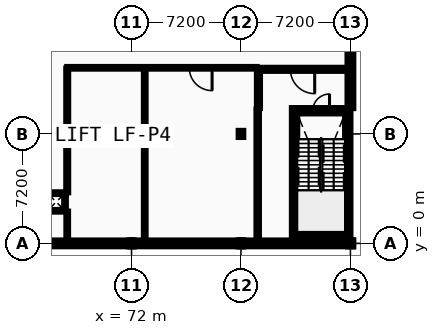
"""IFC4 building model, lengths in metres.
Left out: names, types, materials, properties, quantities, classifications, styles, units other than length and angle.
Written with IfcOpenShell. Run it as: python <this file> out.ifc"""

import sys

from ifc_helpers import new_model, si_unit, direction, frame, frame_2d, origin, origin_2d, place, context, subcontext, project, spatial, rectangle, i_section, extrude, element, fill, save


model = new_model("IFC4")
c1 = context("Model", 3, precision=1e-05, world=origin(), true_north=direction((0.0, 1.0)))
c2 = subcontext(c1, "Body", "Model", "MODEL_VIEW")
j1 = project(units=[si_unit("LENGTHUNIT", "METRE"), si_unit("PLANEANGLEUNIT", "RADIAN")], contexts=[c1])
p1 = place(None, origin())
s1 = spatial("IfcSite", under=j1, at=p1, CompositionType="ELEMENT")
p2 = place(p1, origin())
s2 = spatial("IfcBuilding", under=s1, at=p2, CompositionType="ELEMENT")
p3 = place(p2, frame((0.0, 0.0, 5.2)))
s3 = spatial("IfcBuildingStorey", under=s2, at=p3, CompositionType="ELEMENT", Elevation=5.2)
for number, where, z_axis, x_axis in (
    (1, (72.0, 0.0, 0.0), (0.0, 0.0, 1.0), (1.0, 0.0, 0.0)),
    (2, (72.0, 7.2, 0.0), (0.0, 0.0, 1.0), (1.0, 0.0, 0.0)),
    (3, (79.2, 0.0, 0.0), (0.0, 0.0, 1.0), (1.0, 0.0, 0.0)),
    (4, (79.2, 7.2, 0.0), (0.0, 0.0, 1.0), (1.0, 0.0, 0.0)),
    (5, (86.4, 0.0, 0.0), (0.0, 0.0, 1.0), (1.0, 0.0, 0.0)),
):
    element("IfcColumn", number, at=place(p3, frame(where, z_axis=z_axis, x_axis=x_axis)), inside=s3, PredefinedType="COLUMN", context=c2, shape_type="SweptSolid", body=[
        extrude(i_section(OverallWidth=0.3, OverallDepth=0.4, WebThickness=0.013, FlangeThickness=0.024, FilletRadius=0.027, at=origin_2d()), origin(), (0.0, 0.0, 1.0), 4.4),
    ])
p4 = place(p3, frame((64.8, 0.0, 0.0), z_axis=(0.0, 0.0, 1.0), x_axis=(1.0, 0.0, 0.0)))
e6 = element("IfcWall", 6, at=p4, inside=s3, PredefinedType="STANDARD", context=c2, shape_type="SweptSolid", body=[
    extrude(rectangle(XDim=7.2, YDim=0.38, at=frame_2d((3.6, 0.0))), origin(), (0.0, 0.0, 1.0), 3.88),
])
p5 = place(p4, frame((1.611, 0.0, 0.95)))
e7 = element("IfcOpeningElement", 7, at=p5, cuts=e6, PredefinedType="OPENING", context=c2, shape_type="SweptSolid", body=[
    extrude(rectangle(XDim=1.098, YDim=1.26, at=frame_2d((0.549, 0.63))), frame((0.0, 0.2, 0.0), z_axis=(0.0, -1.0, 0.0), x_axis=(1.0, 0.0, 0.0)), (0.0, 0.0, 1.0), 0.4),
])
p6 = place(p4, frame((4.491, 0.0, 0.95)))
e8 = element("IfcOpeningElement", 8, at=p6, cuts=e6, PredefinedType="OPENING", context=c2, shape_type="SweptSolid", body=[
    extrude(rectangle(XDim=1.098, YDim=1.26, at=frame_2d((0.549, 0.63))), frame((0.0, 0.2, 0.0), z_axis=(0.0, -1.0, 0.0), x_axis=(1.0, 0.0, 0.0)), (0.0, 0.0, 1.0), 0.4),
])
p7 = place(p3, frame((72.0, 0.0, 0.0), z_axis=(0.0, 0.0, 1.0), x_axis=(1.0, 0.0, 0.0)))
e9 = element("IfcWall", 9, at=p7, inside=s3, PredefinedType="STANDARD", context=c2, shape_type="SweptSolid", body=[
    extrude(rectangle(XDim=7.2, YDim=0.38, at=frame_2d((3.6, 0.0))), origin(), (0.0, 0.0, 1.0), 3.88),
])
p8 = place(p7, frame((1.594, 0.0, 0.95)))
e10 = element("IfcOpeningElement", 10, at=p8, cuts=e9, PredefinedType="OPENING", context=c2, shape_type="SweptSolid", body=[
    extrude(rectangle(XDim=1.132, YDim=1.26, at=frame_2d((0.566, 0.63))), frame((0.0, 0.2, 0.0), z_axis=(0.0, -1.0, 0.0), x_axis=(1.0, 0.0, 0.0)), (0.0, 0.0, 1.0), 0.4),
])
p9 = place(p7, frame((4.474, 0.0, 0.95)))
e11 = element("IfcOpeningElement", 11, at=p9, cuts=e9, PredefinedType="OPENING", context=c2, shape_type="SweptSolid", body=[
    extrude(rectangle(XDim=1.132, YDim=1.26, at=frame_2d((0.566, 0.63))), frame((0.0, 0.2, 0.0), z_axis=(0.0, -1.0, 0.0), x_axis=(1.0, 0.0, 0.0)), (0.0, 0.0, 1.0), 0.4),
])
p10 = place(p3, frame((79.2, 0.0, 0.0), z_axis=(0.0, 0.0, 1.0), x_axis=(1.0, 0.0, 0.0)))
e12 = element("IfcWall", 12, at=p10, inside=s3, PredefinedType="STANDARD", context=c2, shape_type="SweptSolid", body=[
    extrude(rectangle(XDim=7.39, YDim=0.38, at=frame_2d((3.695, 0.0))), origin(), (0.0, 0.0, 1.0), 3.88),
])
p11 = place(p10, frame((1.634, 0.0, 0.95)))
e13 = element("IfcOpeningElement", 13, at=p11, cuts=e12, PredefinedType="OPENING", context=c2, shape_type="SweptSolid", body=[
    extrude(rectangle(XDim=1.166, YDim=1.26, at=frame_2d((0.583, 0.63))), frame((0.0, 0.2, 0.0), z_axis=(0.0, -1.0, 0.0), x_axis=(1.0, 0.0, 0.0)), (0.0, 0.0, 1.0), 0.4),
])
p12 = place(p10, frame((4.59, 0.0, 0.95)))
e14 = element("IfcOpeningElement", 14, at=p12, cuts=e12, PredefinedType="OPENING", context=c2, shape_type="SweptSolid", body=[
    extrude(rectangle(XDim=1.166, YDim=1.26, at=frame_2d((0.583, 0.63))), frame((0.0, 0.2, 0.0), z_axis=(0.0, -1.0, 0.0), x_axis=(1.0, 0.0, 0.0)), (0.0, 0.0, 1.0), 0.4),
])
p13 = place(p3, frame((86.4, 8.9, 0.0), z_axis=(0.0, 0.0, 1.0), x_axis=(0.0, 1.0, 0.0)))
e15 = element("IfcWall", 15, at=p13, inside=s3, PredefinedType="STANDARD", context=c2, shape_type="SweptSolid", body=[
    extrude(rectangle(XDim=5.5, YDim=0.38, at=frame_2d((2.75, 0.0))), origin(), (0.0, 0.0, 1.0), 4.185),
])
p14 = place(p3, frame((82.9, 0.575, 0.0), z_axis=(0.0, 0.0, 1.0), x_axis=(1.0, 0.0, 0.0)))
e16 = element("IfcWall", 16, at=p14, inside=s3, PredefinedType="SHEAR", context=c2, shape_type="SweptSolid", body=[
    extrude(rectangle(XDim=3.15, YDim=0.35, at=frame_2d((1.575, 0.0))), origin(), (0.0, 0.0, 1.0), 4.185),
])
p15 = place(p3, frame((82.9, 8.725, 0.0), z_axis=(0.0, 0.0, 1.0), x_axis=(1.0, 0.0, 0.0)))
e17 = element("IfcWall", 17, at=p15, inside=s3, PredefinedType="SHEAR", context=c2, shape_type="SweptSolid", body=[
    extrude(rectangle(XDim=3.15, YDim=0.35, at=frame_2d((1.575, 0.0))), origin(), (0.0, 0.0, 1.0), 4.185),
])
p16 = place(p15, frame((1.025, 0.0, 0.0)))
e18 = element("IfcOpeningElement", 18, at=p16, cuts=e17, PredefinedType="OPENING", context=c2, shape_type="SweptSolid", body=[
    extrude(rectangle(XDim=1.1, YDim=2.15, at=frame_2d((0.55, 1.075))), frame((0.0, 0.185, 0.0), z_axis=(0.0, -1.0, 0.0), x_axis=(1.0, 0.0, 0.0)), (0.0, 0.0, 1.0), 0.37),
])
for number, where, z_axis, x_axis in (
    (19, (82.725, 0.19, 0.0), (0.0, 0.0, 1.0), (0.0, 1.0, 0.0)),
    (20, (86.225, 0.19, 0.0), (0.0, 0.0, 1.0), (0.0, 1.0, 0.0)),
):
    element("IfcWall", number, at=place(p3, frame(where, z_axis=z_axis, x_axis=x_axis)), inside=s3, PredefinedType="SHEAR", context=c2, shape_type="SweptSolid", body=[
        extrude(rectangle(XDim=8.71, YDim=0.35, at=frame_2d((4.355, 0.0))), origin(), (0.0, 0.0, 1.0), 4.185),
    ])
p17 = place(p3, frame((80.45, 11.45, 0.0), z_axis=(0.0, 0.0, 1.0), x_axis=(1.0, 0.0, 0.0)))
e21 = element("IfcWall", 21, at=p17, inside=s3, PredefinedType="PARTITIONING", context=c2, shape_type="SweptSolid", body=[
    extrude(rectangle(XDim=5.6, YDim=0.2, at=frame_2d((2.8, 0.0))), origin(), (0.0, 0.0, 1.0), 4.185),
])
p18 = place(p17, frame((2.0, 0.0, 0.0)))
e22 = element("IfcOpeningElement", 22, at=p18, cuts=e21, PredefinedType="OPENING", context=c2, shape_type="SweptSolid", body=[
    extrude(rectangle(XDim=1.6, YDim=2.2, at=frame_2d((0.8, 1.1))), frame((0.0, 0.11, 0.0), z_axis=(0.0, -1.0, 0.0), x_axis=(1.0, 0.0, 0.0)), (0.0, 0.0, 1.0), 0.22),
])
p19 = place(p3, frame((80.35, 8.9, 0.0), z_axis=(0.0, 0.0, 1.0), x_axis=(0.0, 1.0, 0.0)))
e23 = element("IfcWall", 23, at=p19, inside=s3, PredefinedType="PARTITIONING", context=c2, shape_type="SweptSolid", body=[
    extrude(rectangle(XDim=2.45, YDim=0.2, at=frame_2d((1.225, 0.0))), origin(), (0.0, 0.0, 1.0), 4.185),
])
for number, where, z_axis, x_axis in (
    (24, (66.41, 2.145, 0.0), (0.0, 0.0, 1.0), (1.0, 0.0, 0.0)),
    (25, (66.41, 3.305, 0.0), (0.0, 0.0, 1.0), (1.0, 0.0, 0.0)),
):
    element("IfcWall", number, at=place(p3, frame(where, z_axis=z_axis, x_axis=x_axis)), inside=s3, PredefinedType="PARTITIONING", context=c2, shape_type="SweptSolid", body=[
        extrude(rectangle(XDim=1.27, YDim=0.11, at=frame_2d((0.635, 0.0))), origin(), (0.0, 0.0, 1.0), 4.185),
    ])
p20 = place(p3, frame((67.625, 2.2, 0.0), z_axis=(0.0, 0.0, 1.0), x_axis=(0.0, 1.0, 0.0)))
e26 = element("IfcWall", 26, at=p20, inside=s3, PredefinedType="PARTITIONING", context=c2, shape_type="SweptSolid", body=[
    extrude(rectangle(XDim=1.05, YDim=0.11, at=frame_2d((0.525, 0.0))), origin(), (0.0, 0.0, 1.0), 4.185),
])
p21 = place(p3, frame((67.77, 11.55, 0.0), z_axis=(0.0, 0.0, 1.0), x_axis=(1.0, 0.0, 0.0)))
e27 = element("IfcWall", 27, at=p21, inside=s3, PredefinedType="PARTITIONING", context=c2, shape_type="SweptSolid", body=[
    extrude(rectangle(XDim=12.46, YDim=0.11, at=frame_2d((6.23, 0.0))), origin(), (0.0, 0.0, 1.0), 4.185),
])
p22 = place(p21, frame((0.45, 0.0, 0.0)))
e28 = element("IfcOpeningElement", 28, at=p22, cuts=e27, PredefinedType="OPENING", context=c2, shape_type="SweptSolid", body=[
    extrude(rectangle(XDim=1.0, YDim=2.1, at=frame_2d((0.5, 1.05))), frame((0.0, 0.065, 0.0), z_axis=(0.0, -1.0, 0.0), x_axis=(1.0, 0.0, 0.0)), (0.0, 0.0, 1.0), 0.13),
])
p23 = place(p21, frame((8.03, 0.0, 0.0)))
e29 = element("IfcOpeningElement", 29, at=p23, cuts=e27, PredefinedType="OPENING", context=c2, shape_type="SweptSolid", body=[
    extrude(rectangle(XDim=1.5, YDim=2.2, at=frame_2d((0.75, 1.1))), frame((0.0, 0.065, 0.0), z_axis=(0.0, -1.0, 0.0), x_axis=(1.0, 0.0, 0.0)), (0.0, 0.0, 1.0), 0.13),
])
p24 = place(p3, frame((67.77, 0.2, 0.0), z_axis=(0.0, 0.0, 1.0), x_axis=(0.0, 1.0, 0.0)))
e30 = element("IfcWall", 30, at=p24, inside=s3, PredefinedType="PARTITIONING", context=c2, shape_type="SweptSolid", body=[
    extrude(rectangle(XDim=1.89, YDim=0.11, at=frame_2d((0.945, 0.0))), origin(), (0.0, 0.0, 1.0), 4.185),
])
p25 = place(p3, frame((67.77, 3.36, 0.0), z_axis=(0.0, 0.0, 1.0), x_axis=(0.0, 1.0, 0.0)))
e31 = element("IfcWall", 31, at=p25, inside=s3, PredefinedType="PARTITIONING", context=c2, shape_type="SweptSolid", body=[
    extrude(rectangle(XDim=8.135, YDim=0.125, at=frame_2d((4.067, 0.0))), origin(), (0.0, 0.0, 1.0), 4.185),
])
p26 = place(p3, frame((72.87, 0.2, 0.0), z_axis=(0.0, 0.0, 1.0), x_axis=(0.0, 1.0, 0.0)))
e32 = element("IfcWall", 32, at=p26, inside=s3, PredefinedType="PARTITIONING", context=c2, shape_type="SweptSolid", body=[
    extrude(rectangle(XDim=11.295, YDim=0.11, at=frame_2d((5.647, 0.0))), origin(), (0.0, 0.0, 1.0), 4.185),
])
p27 = place(p3, frame((80.3, 0.2, 0.0), z_axis=(0.0, 0.0, 1.0), x_axis=(0.0, 1.0, 0.0)))
e33 = element("IfcWall", 33, at=p27, inside=s3, PredefinedType="PARTITIONING", context=c2, shape_type="SweptSolid", body=[
    extrude(rectangle(XDim=8.6, YDim=0.16, at=frame_2d((4.3, 0.0))), origin(), (0.0, 0.0, 1.0), 4.185),
])
p28 = place(p5, origin())
e34 = element("IfcWindow", 34, at=p28, inside=s3, PartitioningType="SINGLE_PANEL", PredefinedType="WINDOW", context=c2, shape_type="SweptSolid", body=[
    extrude(rectangle(XDim=1.098, YDim=1.26, at=frame_2d((0.549, 0.63))), frame((0.0, 0.03, 0.0), z_axis=(0.0, -1.0, 0.0), x_axis=(1.0, 0.0, 0.0)), (0.0, 0.0, 1.0), 0.06),
])
fill(e7, e34)
p29 = place(p6, origin())
e35 = element("IfcWindow", 35, at=p29, inside=s3, PartitioningType="SINGLE_PANEL", PredefinedType="WINDOW", context=c2, shape_type="SweptSolid", body=[
    extrude(rectangle(XDim=1.098, YDim=1.26, at=frame_2d((0.549, 0.63))), frame((0.0, 0.03, 0.0), z_axis=(0.0, -1.0, 0.0), x_axis=(1.0, 0.0, 0.0)), (0.0, 0.0, 1.0), 0.06),
])
fill(e8, e35)
p30 = place(p8, origin())
e36 = element("IfcWindow", 36, at=p30, inside=s3, PartitioningType="SINGLE_PANEL", PredefinedType="WINDOW", context=c2, shape_type="SweptSolid", body=[
    extrude(rectangle(XDim=1.132, YDim=1.26, at=frame_2d((0.566, 0.63))), frame((0.0, 0.03, 0.0), z_axis=(0.0, -1.0, 0.0), x_axis=(1.0, 0.0, 0.0)), (0.0, 0.0, 1.0), 0.06),
])
fill(e10, e36)
p31 = place(p9, origin())
e37 = element("IfcWindow", 37, at=p31, inside=s3, PartitioningType="SINGLE_PANEL", PredefinedType="WINDOW", context=c2, shape_type="SweptSolid", body=[
    extrude(rectangle(XDim=1.132, YDim=1.26, at=frame_2d((0.566, 0.63))), frame((0.0, 0.03, 0.0), z_axis=(0.0, -1.0, 0.0), x_axis=(1.0, 0.0, 0.0)), (0.0, 0.0, 1.0), 0.06),
])
fill(e11, e37)
p32 = place(p11, origin())
e38 = element("IfcWindow", 38, at=p32, inside=s3, PartitioningType="SINGLE_PANEL", PredefinedType="WINDOW", context=c2, shape_type="SweptSolid", body=[
    extrude(rectangle(XDim=1.166, YDim=1.26, at=frame_2d((0.583, 0.63))), frame((0.0, 0.03, 0.0), z_axis=(0.0, -1.0, 0.0), x_axis=(1.0, 0.0, 0.0)), (0.0, 0.0, 1.0), 0.06),
])
fill(e13, e38)
p33 = place(p12, origin())
e39 = element("IfcWindow", 39, at=p33, inside=s3, PartitioningType="SINGLE_PANEL", PredefinedType="WINDOW", context=c2, shape_type="SweptSolid", body=[
    extrude(rectangle(XDim=1.166, YDim=1.26, at=frame_2d((0.583, 0.63))), frame((0.0, 0.03, 0.0), z_axis=(0.0, -1.0, 0.0), x_axis=(1.0, 0.0, 0.0)), (0.0, 0.0, 1.0), 0.06),
])
fill(e14, e39)
p34 = place(p16, frame((1.1, 0.0, 0.0), z_axis=(0.0, 0.0, 1.0), x_axis=(-1.0, 0.0, 0.0)))
e40 = element("IfcDoor", 40, at=p34, inside=s3, OperationType="SINGLE_SWING_RIGHT", PredefinedType="DOOR", context=c2, shape_type="SweptSolid", body=[
    extrude(rectangle(XDim=1.1, YDim=2.15, at=frame_2d((0.55, 1.075))), frame((0.0, 0.025, 0.0), z_axis=(0.0, -1.0, 0.0), x_axis=(1.0, 0.0, 0.0)), (0.0, 0.0, 1.0), 0.05),
])
fill(e18, e40)
p35 = place(p18, origin())
e41 = element("IfcDoor", 41, at=p35, inside=s3, OperationType="DOUBLE_DOOR_SINGLE_SWING", PredefinedType="DOOR", context=c2, shape_type="SweptSolid", body=[
    extrude(rectangle(XDim=1.6, YDim=2.2, at=frame_2d((0.8, 1.1))), frame((0.0, 0.025, 0.0), z_axis=(0.0, -1.0, 0.0), x_axis=(1.0, 0.0, 0.0)), (0.0, 0.0, 1.0), 0.05),
])
fill(e22, e41)
p36 = place(p22, origin())
e42 = element("IfcDoor", 42, at=p36, inside=s3, OperationType="SLIDING_TO_LEFT", PredefinedType="DOOR", context=c2, shape_type="SweptSolid", body=[
    extrude(rectangle(XDim=1.0, YDim=2.1, at=frame_2d((0.5, 1.05))), frame((0.0, 0.025, 0.0), z_axis=(0.0, -1.0, 0.0), x_axis=(1.0, 0.0, 0.0)), (0.0, 0.0, 1.0), 0.05),
])
fill(e28, e42)
p37 = place(p23, origin())
e43 = element("IfcDoor", 43, at=p37, inside=s3, OperationType="DOUBLE_DOOR_SINGLE_SWING", PredefinedType="DOOR", context=c2, shape_type="SweptSolid", body=[
    extrude(rectangle(XDim=1.5, YDim=2.2, at=frame_2d((0.75, 1.1))), frame((0.0, 0.025, 0.0), z_axis=(0.0, -1.0, 0.0), x_axis=(1.0, 0.0, 0.0)), (0.0, 0.0, 1.0), 0.05),
])
fill(e29, e43)
save(model, sys.argv[1])
